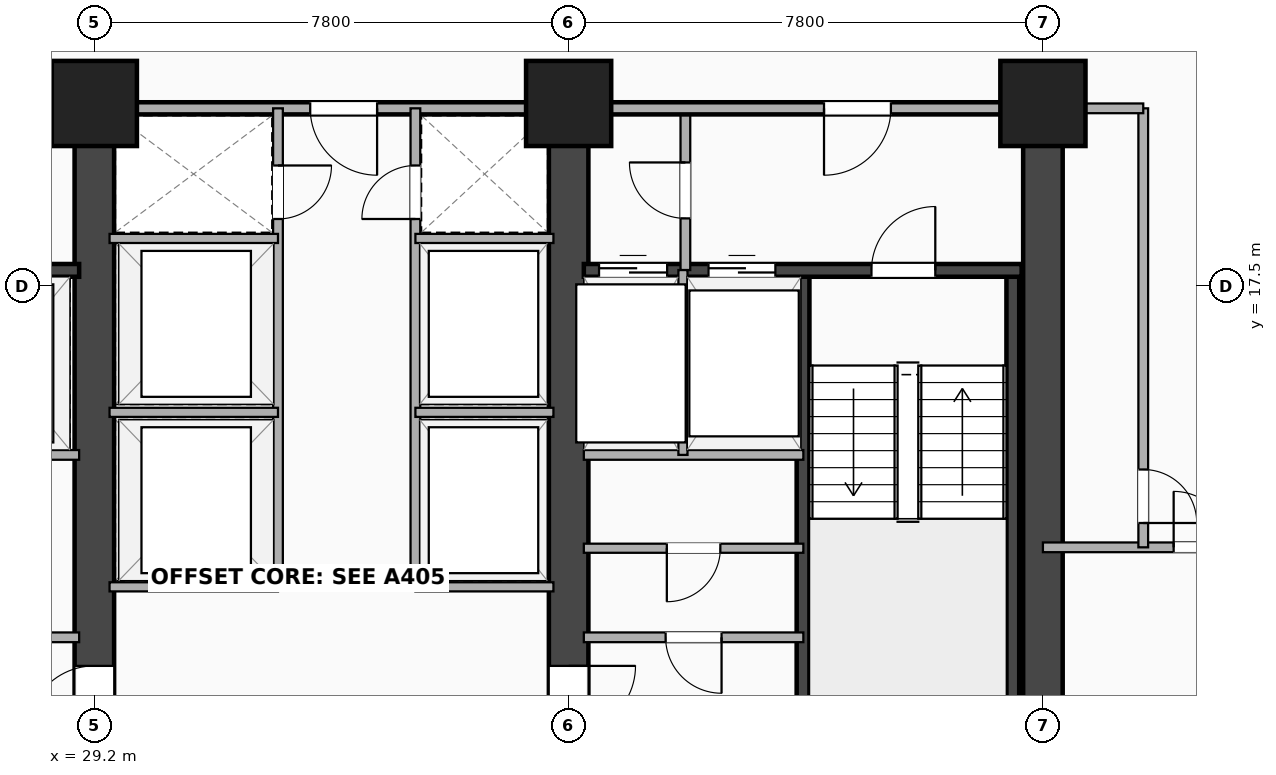
"""IFC4 building model, lengths in metres.
Left out: names, types, materials, properties, quantities, classifications, styles, units other than length and angle.
Written with IfcOpenShell. Run it as: python <this file> out.ifc"""

import sys

from ifc_helpers import new_model, si_unit, direction, frame, frame_2d, origin, origin_2d, place, context, subcontext, project, spatial, rectangle, extrude, element, fill, save


model = new_model("IFC4")
c1 = context("Model", 3, precision=1e-05, world=origin(), true_north=direction((0.0, 1.0)))
c2 = subcontext(c1, "Body", "Model", "MODEL_VIEW")
j1 = project(units=[si_unit("LENGTHUNIT", "METRE"), si_unit("PLANEANGLEUNIT", "RADIAN")], contexts=[c1])
p1 = place(None, origin())
s1 = spatial("IfcSite", under=j1, at=p1, CompositionType="ELEMENT")
p2 = place(p1, origin())
s2 = spatial("IfcBuilding", under=s1, at=p2, CompositionType="ELEMENT")
p3 = place(p2, frame((0.0, 0.0, 71.9)))
s3 = spatial("IfcBuildingStorey", under=s2, at=p3, CompositionType="ELEMENT", Elevation=71.9)
p4 = place(p3, frame((44.8, 3.5, 0.0), z_axis=(0.0, 0.0, 1.0), x_axis=(0.0, 1.0, 0.0)))
e1 = element("IfcWall", 1, at=p4, inside=s3, PredefinedType="SHEAR", context=c2, shape_type="SweptSolid", body=[
    extrude(rectangle(XDim=16.9, YDim=0.65, at=frame_2d((8.45, 0.0))), origin(), (0.0, 0.0, 1.0), 3.18),
])
p5 = place(p3, frame((29.2, 3.5, 0.0), z_axis=(0.0, 0.0, 1.0), x_axis=(0.0, 1.0, 0.0)))
e2 = element("IfcWall", 2, at=p5, inside=s3, PredefinedType="SHEAR", context=c2, shape_type="SweptSolid", body=[
    extrude(rectangle(XDim=16.9, YDim=0.65, at=frame_2d((8.45, 0.0))), origin(), (0.0, 0.0, 1.0), 3.18),
])
p6 = place(p5, frame((7.75, 0.0, 0.0), z_axis=(0.0, 0.0, 1.0), x_axis=(-1.0, 0.0, 0.0)))
e3 = element("IfcOpeningElement", 3, at=p6, cuts=e2, PredefinedType="OPENING", context=c2, shape_type="SweptSolid", body=[
    extrude(rectangle(XDim=1.1, YDim=2.15, at=frame_2d((0.55, 1.075))), frame((0.0, 0.335, 0.0), z_axis=(0.0, -1.0, 0.0), x_axis=(1.0, 0.0, 0.0)), (0.0, 0.0, 1.0), 0.67),
])
p7 = place(p3, frame((37.0, 3.5, 0.0), z_axis=(0.0, 0.0, 1.0), x_axis=(0.0, 1.0, 0.0)))
e4 = element("IfcWall", 4, at=p7, inside=s3, PredefinedType="SHEAR", context=c2, shape_type="SweptSolid", body=[
    extrude(rectangle(XDim=16.9, YDim=0.65, at=frame_2d((8.45, 0.0))), origin(), (0.0, 0.0, 1.0), 3.18),
])
p8 = place(p7, frame((6.65, 0.0, 0.0)))
e5 = element("IfcOpeningElement", 5, at=p8, cuts=e4, PredefinedType="OPENING", context=c2, shape_type="SweptSolid", body=[
    extrude(rectangle(XDim=1.1, YDim=2.15, at=frame_2d((0.55, 1.075))), frame((0.0, 0.335, 0.0), z_axis=(0.0, -1.0, 0.0), x_axis=(1.0, 0.0, 0.0)), (0.0, 0.0, 1.0), 0.67),
])
p9 = place(p3, frame((20.65, 17.755, 0.0), z_axis=(0.0, 0.0, 1.0), x_axis=(1.0, 0.0, 0.0)))
e6 = element("IfcWall", 6, at=p9, inside=s3, PredefinedType="SHEAR", context=c2, shape_type="SweptSolid", body=[
    extrude(rectangle(XDim=8.3, YDim=0.21, at=frame_2d((4.15, 0.0))), origin(), (0.0, 0.0, 1.0), 3.18),
])
p10 = place(p9, frame((2.2, 0.0, 0.0), z_axis=(0.0, 0.0, 1.0), x_axis=(-1.0, 0.0, 0.0)))
e7 = element("IfcOpeningElement", 7, at=p10, cuts=e6, PredefinedType="OPENING", context=c2, shape_type="SweptSolid", body=[
    extrude(rectangle(XDim=1.05, YDim=2.15, at=frame_2d((0.525, 1.075))), frame((0.0, 0.115, 0.0), z_axis=(0.0, -1.0, 0.0), x_axis=(1.0, 0.0, 0.0)), (0.0, 0.0, 1.0), 0.23),
])
p11 = place(p9, frame((4.15, 0.0, 0.0)))
e8 = element("IfcOpeningElement", 8, at=p11, cuts=e6, PredefinedType="OPENING", context=c2, shape_type="SweptSolid", body=[
    extrude(rectangle(XDim=1.1, YDim=2.18, at=frame_2d((0.55, 1.09))), frame((0.0, 0.115, 0.0), z_axis=(0.0, -1.0, 0.0), x_axis=(1.0, 0.0, 0.0)), (0.0, 0.0, 1.0), 0.23),
])
p12 = place(p9, frame((6.45, 0.0, 0.0)))
e9 = element("IfcOpeningElement", 9, at=p12, cuts=e6, PredefinedType="OPENING", context=c2, shape_type="SweptSolid", body=[
    extrude(rectangle(XDim=1.12, YDim=2.2, at=frame_2d((0.56, 1.1))), frame((0.0, 0.115, 0.0), z_axis=(0.0, -1.0, 0.0), x_axis=(1.0, 0.0, 0.0)), (0.0, 0.0, 1.0), 0.23),
])
for number, where, z_axis, x_axis in (
    (10, (40.855, 9.745, 0.0), (0.0, 0.0, 1.0), (0.0, 1.0, 0.0)),
    (11, (44.305, 9.745, 0.0), (0.0, 0.0, 1.0), (0.0, 1.0, 0.0)),
):
    element("IfcWall", number, at=place(p3, frame(where, z_axis=z_axis, x_axis=x_axis)), inside=s3, PredefinedType="SHEAR", context=c2, shape_type="SweptSolid", body=[
        extrude(rectangle(XDim=8.01, YDim=0.21, at=frame_2d((4.005, 0.0))), origin(), (0.0, 0.0, 1.0), 3.18),
    ])
p13 = place(p3, frame((37.25, 17.755, 0.0), z_axis=(0.0, 0.0, 1.0), x_axis=(1.0, 0.0, 0.0)))
e12 = element("IfcWall", 12, at=p13, inside=s3, PredefinedType="SHEAR", context=c2, shape_type="SweptSolid", body=[
    extrude(rectangle(XDim=7.2, YDim=0.21, at=frame_2d((3.6, 0.0))), origin(), (0.0, 0.0, 1.0), 3.18),
])
p14 = place(p13, frame((0.25, 0.0, 0.0)))
e13 = element("IfcOpeningElement", 13, at=p14, cuts=e12, PredefinedType="OPENING", context=c2, shape_type="SweptSolid", body=[
    extrude(rectangle(XDim=1.12, YDim=2.2, at=frame_2d((0.56, 1.1))), frame((0.0, 0.115, 0.0), z_axis=(0.0, -1.0, 0.0), x_axis=(1.0, 0.0, 0.0)), (0.0, 0.0, 1.0), 0.23),
])
p15 = place(p13, frame((2.05, 0.0, 0.0)))
e14 = element("IfcOpeningElement", 14, at=p15, cuts=e12, PredefinedType="OPENING", context=c2, shape_type="SweptSolid", body=[
    extrude(rectangle(XDim=1.1, YDim=2.18, at=frame_2d((0.55, 1.09))), frame((0.0, 0.115, 0.0), z_axis=(0.0, -1.0, 0.0), x_axis=(1.0, 0.0, 0.0)), (0.0, 0.0, 1.0), 0.23),
])
p16 = place(p13, frame((5.78, 0.0, 0.0), z_axis=(0.0, 0.0, 1.0), x_axis=(-1.0, 0.0, 0.0)))
e15 = element("IfcOpeningElement", 15, at=p16, cuts=e12, PredefinedType="OPENING", context=c2, shape_type="SweptSolid", body=[
    extrude(rectangle(XDim=1.05, YDim=2.15, at=frame_2d((0.525, 1.075))), frame((0.0, 0.115, 0.0), z_axis=(0.0, -1.0, 0.0), x_axis=(1.0, 0.0, 0.0)), (0.0, 0.0, 1.0), 0.23),
])
for number, where, z_axis, x_axis in (
    (16, (29.2, 20.5, -0.28), (0.0, 0.0, 1.0), (1.0, 0.0, 0.0)),
    (17, (37.0, 20.5, -0.28), (0.0, 0.0, 1.0), (1.0, 0.0, 0.0)),
    (18, (44.8, 20.5, -0.28), (0.0, 0.0, 1.0), (1.0, 0.0, 0.0)),
):
    element("IfcColumn", number, at=place(p3, frame(where, z_axis=z_axis, x_axis=x_axis)), inside=s3, PredefinedType="COLUMN", context=c2, shape_type="SweptSolid", body=[
        extrude(rectangle(XDim=1.4, YDim=1.4, at=origin_2d()), origin(), (0.0, 0.0, 1.0), 3.46),
    ])
p17 = place(p3, frame((38.92, 17.76, 0.0), z_axis=(0.0, 0.0, 1.0), x_axis=(0.0, 1.0, 0.0)))
e19 = element("IfcWall", 19, at=p17, inside=s3, PredefinedType="PARTITIONING", context=c2, shape_type="SweptSolid", body=[
    extrude(rectangle(XDim=2.66, YDim=0.16, at=frame_2d((1.33, 0.0))), origin(), (0.0, 0.0, 1.0), 2.47),
])
p18 = place(p17, frame((1.77, 0.0, 0.0), z_axis=(0.0, 0.0, 1.0), x_axis=(-1.0, 0.0, 0.0)))
e20 = element("IfcOpeningElement", 20, at=p18, cuts=e19, PredefinedType="OPENING", context=c2, shape_type="SweptSolid", body=[
    extrude(rectangle(XDim=0.92, YDim=2.08, at=frame_2d((0.46, 1.04))), frame((0.0, 0.09, 0.0), z_axis=(0.0, -1.0, 0.0), x_axis=(1.0, 0.0, 0.0)), (0.0, 0.0, 1.0), 0.18),
])
p19 = place(p3, frame((24.22, 14.72, 0.0), z_axis=(0.0, 0.0, 1.0), x_axis=(1.0, 0.0, 0.0)))
e21 = element("IfcWall", 21, at=p19, inside=s3, PredefinedType="PARTITIONING", context=c2, shape_type="SweptSolid", body=[
    extrude(rectangle(XDim=4.73, YDim=0.16, at=frame_2d((2.365, 0.0))), origin(), (0.0, 0.0, 1.0), 3.18),
])
p20 = place(p3, frame((37.25, 14.72, 0.0), z_axis=(0.0, 0.0, 1.0), x_axis=(1.0, 0.0, 0.0)))
e22 = element("IfcWall", 22, at=p20, inside=s3, PredefinedType="PARTITIONING", context=c2, shape_type="SweptSolid", body=[
    extrude(rectangle(XDim=3.61, YDim=0.16, at=frame_2d((1.805, 0.0))), origin(), (0.0, 0.0, 1.0), 3.18),
])
p21 = place(p3, frame((38.88, 14.72, 0.0), z_axis=(0.0, 0.0, 1.0), x_axis=(0.0, 1.0, 0.0)))
e23 = element("IfcWall", 23, at=p21, inside=s3, PredefinedType="PARTITIONING", context=c2, shape_type="SweptSolid", body=[
    extrude(rectangle(XDim=3.04, YDim=0.15, at=frame_2d((1.52, 0.0))), origin(), (0.0, 0.0, 1.0), 3.18),
])
p22 = place(p3, frame((26.38, 20.42, 0.0), z_axis=(0.0, 0.0, 1.0), x_axis=(1.0, 0.0, 0.0)))
e24 = element("IfcWall", 24, at=p22, inside=s3, PredefinedType="PARTITIONING", context=c2, shape_type="SweptSolid", body=[
    extrude(rectangle(XDim=2.82, YDim=0.2, at=frame_2d((1.41, 0.0))), origin(), (0.0, 0.0, 1.0), 2.47),
])
p23 = place(p3, frame((29.2, 20.42, 0.0), z_axis=(0.0, 0.0, 1.0), x_axis=(1.0, 0.0, 0.0)))
e25 = element("IfcWall", 25, at=p23, inside=s3, PredefinedType="PARTITIONING", context=c2, shape_type="SweptSolid", body=[
    extrude(rectangle(XDim=7.8, YDim=0.2, at=frame_2d((3.9, 0.0))), origin(), (0.0, 0.0, 1.0), 2.47),
])
p24 = place(p23, frame((3.55, 0.0, 0.0)))
e26 = element("IfcOpeningElement", 26, at=p24, cuts=e25, PredefinedType="OPENING", context=c2, shape_type="SweptSolid", body=[
    extrude(rectangle(XDim=1.1, YDim=2.15, at=frame_2d((0.55, 1.075))), frame((0.0, 0.11, 0.0), z_axis=(0.0, -1.0, 0.0), x_axis=(1.0, 0.0, 0.0)), (0.0, 0.0, 1.0), 0.22),
])
p25 = place(p3, frame((37.0, 20.42, 0.0), z_axis=(0.0, 0.0, 1.0), x_axis=(1.0, 0.0, 0.0)))
e27 = element("IfcWall", 27, at=p25, inside=s3, PredefinedType="PARTITIONING", context=c2, shape_type="SweptSolid", body=[
    extrude(rectangle(XDim=7.45, YDim=0.2, at=frame_2d((3.725, 0.0))), origin(), (0.0, 0.0, 1.0), 2.47),
])
p26 = place(p25, frame((4.2, 0.0, 0.0)))
e28 = element("IfcOpeningElement", 28, at=p26, cuts=e27, PredefinedType="OPENING", context=c2, shape_type="SweptSolid", body=[
    extrude(rectangle(XDim=1.1, YDim=2.15, at=frame_2d((0.55, 1.075))), frame((0.0, 0.11, 0.0), z_axis=(0.0, -1.0, 0.0), x_axis=(1.0, 0.0, 0.0)), (0.0, 0.0, 1.0), 0.22),
])
p27 = place(p3, frame((26.49, 11.72, 0.0), z_axis=(0.0, 0.0, 1.0), x_axis=(1.0, 0.0, 0.0)))
e29 = element("IfcWall", 29, at=p27, inside=s3, PredefinedType="PARTITIONING", context=c2, shape_type="SweptSolid", body=[
    extrude(rectangle(XDim=2.459, YDim=0.16, at=frame_2d((1.23, 0.0))), origin(), (0.0, 0.0, 1.0), 3.18),
])
p28 = place(p27, frame((0.77, 0.0, 0.0)))
e30 = element("IfcOpeningElement", 30, at=p28, cuts=e29, PredefinedType="OPENING", context=c2, shape_type="SweptSolid", body=[
    extrude(rectangle(XDim=0.92, YDim=2.08, at=frame_2d((0.46, 1.04))), frame((0.0, 0.09, 0.0), z_axis=(0.0, -1.0, 0.0), x_axis=(1.0, 0.0, 0.0)), (0.0, 0.0, 1.0), 0.18),
])
p29 = place(p3, frame((37.25, 11.72, 0.0), z_axis=(0.0, 0.0, 1.0), x_axis=(1.0, 0.0, 0.0)))
e31 = element("IfcWall", 31, at=p29, inside=s3, PredefinedType="PARTITIONING", context=c2, shape_type="SweptSolid", body=[
    extrude(rectangle(XDim=3.61, YDim=0.16, at=frame_2d((1.805, 0.0))), origin(), (0.0, 0.0, 1.0), 3.18),
])
p30 = place(p29, frame((1.345, 0.0, 0.0)))
e32 = element("IfcOpeningElement", 32, at=p30, cuts=e31, PredefinedType="OPENING", context=c2, shape_type="SweptSolid", body=[
    extrude(rectangle(XDim=0.92, YDim=2.08, at=frame_2d((0.46, 1.04))), frame((0.0, 0.09, 0.0), z_axis=(0.0, -1.0, 0.0), x_axis=(1.0, 0.0, 0.0)), (0.0, 0.0, 1.0), 0.18),
])
p31 = place(p3, frame((37.25, 13.185, 0.0), z_axis=(0.0, 0.0, 1.0), x_axis=(1.0, 0.0, 0.0)))
e33 = element("IfcWall", 33, at=p31, inside=s3, PredefinedType="PARTITIONING", context=c2, shape_type="SweptSolid", body=[
    extrude(rectangle(XDim=3.61, YDim=0.15, at=frame_2d((1.805, 0.0))), origin(), (0.0, 0.0, 1.0), 3.18),
])
p32 = place(p31, frame((1.365, 0.0, 0.0)))
e34 = element("IfcOpeningElement", 34, at=p32, cuts=e33, PredefinedType="OPENING", context=c2, shape_type="SweptSolid", body=[
    extrude(rectangle(XDim=0.88, YDim=2.08, at=frame_2d((0.44, 1.04))), frame((0.0, 0.085, 0.0), z_axis=(0.0, -1.0, 0.0), x_axis=(1.0, 0.0, 0.0)), (0.0, 0.0, 1.0), 0.17),
])
p33 = place(p3, frame((32.22, 12.5, 0.0), z_axis=(0.0, 0.0, 1.0), x_axis=(0.0, 1.0, 0.0)))
e35 = element("IfcWall", 35, at=p33, inside=s3, PredefinedType="PARTITIONING", context=c2, shape_type="SweptSolid", body=[
    extrude(rectangle(XDim=7.92, YDim=0.16, at=frame_2d((3.96, 0.0))), origin(), (0.0, 0.0, 1.0), 2.47),
])
p34 = place(p33, frame((6.1, 0.0, 0.0)))
e36 = element("IfcOpeningElement", 36, at=p34, cuts=e35, PredefinedType="OPENING", context=c2, shape_type="SweptSolid", body=[
    extrude(rectangle(XDim=0.88, YDim=2.08, at=frame_2d((0.44, 1.04))), frame((0.0, 0.09, 0.0), z_axis=(0.0, -1.0, 0.0), x_axis=(1.0, 0.0, 0.0)), (0.0, 0.0, 1.0), 0.18),
])
p35 = place(p3, frame((34.48, 12.5, 0.0), z_axis=(0.0, 0.0, 1.0), x_axis=(0.0, 1.0, 0.0)))
e37 = element("IfcWall", 37, at=p35, inside=s3, PredefinedType="PARTITIONING", context=c2, shape_type="SweptSolid", body=[
    extrude(rectangle(XDim=7.92, YDim=0.16, at=frame_2d((3.96, 0.0))), origin(), (0.0, 0.0, 1.0), 2.47),
])
p36 = place(p35, frame((6.98, 0.0, 0.0), z_axis=(0.0, 0.0, 1.0), x_axis=(-1.0, 0.0, 0.0)))
e38 = element("IfcOpeningElement", 38, at=p36, cuts=e37, PredefinedType="OPENING", context=c2, shape_type="SweptSolid", body=[
    extrude(rectangle(XDim=0.88, YDim=2.08, at=frame_2d((0.44, 1.04))), frame((0.0, 0.09, 0.0), z_axis=(0.0, -1.0, 0.0), x_axis=(1.0, 0.0, 0.0)), (0.0, 0.0, 1.0), 0.18),
])
p37 = place(p3, frame((29.45, 12.55, 0.0), z_axis=(0.0, 0.0, 1.0), x_axis=(1.0, 0.0, 0.0)))
e39 = element("IfcWall", 39, at=p37, inside=s3, PredefinedType="PARTITIONING", context=c2, shape_type="SweptSolid", body=[
    extrude(rectangle(XDim=2.77, YDim=0.15, at=frame_2d((1.385, 0.0))), origin(), (0.0, 0.0, 1.0), 3.18),
])
p38 = place(p3, frame((34.48, 12.55, 0.0), z_axis=(0.0, 0.0, 1.0), x_axis=(1.0, 0.0, 0.0)))
e40 = element("IfcWall", 40, at=p38, inside=s3, PredefinedType="PARTITIONING", context=c2, shape_type="SweptSolid", body=[
    extrude(rectangle(XDim=2.27, YDim=0.15, at=frame_2d((1.135, 0.0))), origin(), (0.0, 0.0, 1.0), 3.18),
])
p39 = place(p3, frame((29.45, 15.42, 0.0), z_axis=(0.0, 0.0, 1.0), x_axis=(1.0, 0.0, 0.0)))
e41 = element("IfcWall", 41, at=p39, inside=s3, PredefinedType="PARTITIONING", context=c2, shape_type="SweptSolid", body=[
    extrude(rectangle(XDim=2.77, YDim=0.15, at=frame_2d((1.385, 0.0))), origin(), (0.0, 0.0, 1.0), 3.18),
])
p40 = place(p3, frame((34.48, 15.42, 0.0), z_axis=(0.0, 0.0, 1.0), x_axis=(1.0, 0.0, 0.0)))
e42 = element("IfcWall", 42, at=p40, inside=s3, PredefinedType="PARTITIONING", context=c2, shape_type="SweptSolid", body=[
    extrude(rectangle(XDim=2.27, YDim=0.15, at=frame_2d((1.135, 0.0))), origin(), (0.0, 0.0, 1.0), 3.18),
])
p41 = place(p3, frame((29.45, 18.28, 0.0), z_axis=(0.0, 0.0, 1.0), x_axis=(1.0, 0.0, 0.0)))
e43 = element("IfcWall", 43, at=p41, inside=s3, PredefinedType="PARTITIONING", context=c2, shape_type="SweptSolid", body=[
    extrude(rectangle(XDim=2.77, YDim=0.15, at=frame_2d((1.385, 0.0))), origin(), (0.0, 0.0, 1.0), 3.18),
])
p42 = place(p3, frame((34.48, 18.28, 0.0), z_axis=(0.0, 0.0, 1.0), x_axis=(1.0, 0.0, 0.0)))
e44 = element("IfcWall", 44, at=p42, inside=s3, PredefinedType="PARTITIONING", context=c2, shape_type="SweptSolid", body=[
    extrude(rectangle(XDim=2.27, YDim=0.15, at=frame_2d((1.135, 0.0))), origin(), (0.0, 0.0, 1.0), 3.18),
])
p43 = place(p3, frame((44.8, 13.2, 0.0), z_axis=(0.0, 0.0, 1.0), x_axis=(1.0, 0.0, 0.0)))
e45 = element("IfcWall", 45, at=p43, inside=s3, PredefinedType="PARTITIONING", context=c2, shape_type="SweptSolid", body=[
    extrude(rectangle(XDim=3.65, YDim=0.16, at=frame_2d((1.825, 0.0))), origin(), (0.0, 0.0, 1.0), 2.47),
])
p44 = place(p43, frame((3.07, 0.0, 0.0), z_axis=(0.0, 0.0, 1.0), x_axis=(-1.0, 0.0, 0.0)))
e46 = element("IfcOpeningElement", 46, at=p44, cuts=e45, PredefinedType="OPENING", context=c2, shape_type="SweptSolid", body=[
    extrude(rectangle(XDim=0.92, YDim=2.08, at=frame_2d((0.46, 1.04))), frame((0.0, 0.09, 0.0), z_axis=(0.0, -1.0, 0.0), x_axis=(1.0, 0.0, 0.0)), (0.0, 0.0, 1.0), 0.18),
])
p45 = place(p3, frame((46.45, 13.2, 0.0), z_axis=(0.0, 0.0, 1.0), x_axis=(0.0, 1.0, 0.0)))
e47 = element("IfcWall", 47, at=p45, inside=s3, PredefinedType="PARTITIONING", context=c2, shape_type="SweptSolid", body=[
    extrude(rectangle(XDim=7.22, YDim=0.16, at=frame_2d((3.61, 0.0))), origin(), (0.0, 0.0, 1.0), 2.47),
])
p46 = place(p45, frame((0.4, 0.0, 0.0)))
e48 = element("IfcOpeningElement", 48, at=p46, cuts=e47, PredefinedType="OPENING", context=c2, shape_type="SweptSolid", body=[
    extrude(rectangle(XDim=0.88, YDim=2.08, at=frame_2d((0.44, 1.04))), frame((0.0, 0.09, 0.0), z_axis=(0.0, -1.0, 0.0), x_axis=(1.0, 0.0, 0.0)), (0.0, 0.0, 1.0), 0.18),
])
p47 = place(p3, frame((44.8, 20.42, 0.0), z_axis=(0.0, 0.0, 1.0), x_axis=(1.0, 0.0, 0.0)))
e49 = element("IfcWall", 49, at=p47, inside=s3, PredefinedType="PARTITIONING", context=c2, shape_type="SweptSolid", body=[
    extrude(rectangle(XDim=1.65, YDim=0.16, at=frame_2d((0.825, 0.0))), origin(), (0.0, 0.0, 1.0), 2.47),
])
p48 = place(p14, origin())
e50 = element("IfcDoor", 50, at=p48, inside=s3, OperationType="DOUBLE_DOOR_SLIDING", PredefinedType="DOOR", context=c2, shape_type="SweptSolid", body=[
    extrude(rectangle(XDim=1.12, YDim=2.2, at=frame_2d((0.56, 1.1))), frame((0.0, 0.025, 0.0), z_axis=(0.0, -1.0, 0.0), x_axis=(1.0, 0.0, 0.0)), (0.0, 0.0, 1.0), 0.05),
])
fill(e13, e50)
p49 = place(p15, origin())
e51 = element("IfcDoor", 51, at=p49, inside=s3, OperationType="DOUBLE_DOOR_SLIDING", PredefinedType="DOOR", context=c2, shape_type="SweptSolid", body=[
    extrude(rectangle(XDim=1.1, YDim=2.18, at=frame_2d((0.55, 1.09))), frame((0.0, 0.025, 0.0), z_axis=(0.0, -1.0, 0.0), x_axis=(1.0, 0.0, 0.0)), (0.0, 0.0, 1.0), 0.05),
])
fill(e14, e51)
p50 = place(p16, origin())
e52 = element("IfcDoor", 52, at=p50, inside=s3, OperationType="SINGLE_SWING_RIGHT", PredefinedType="DOOR", context=c2, shape_type="SweptSolid", body=[
    extrude(rectangle(XDim=1.05, YDim=2.15, at=frame_2d((0.525, 1.075))), frame((0.0, 0.025, 0.0), z_axis=(0.0, -1.0, 0.0), x_axis=(1.0, 0.0, 0.0)), (0.0, 0.0, 1.0), 0.05),
])
fill(e15, e52)
p51 = place(p6, origin())
e53 = element("IfcDoor", 53, at=p51, inside=s3, OperationType="SINGLE_SWING_LEFT", PredefinedType="DOOR", context=c2, shape_type="SweptSolid", body=[
    extrude(rectangle(XDim=1.1, YDim=2.15, at=frame_2d((0.55, 1.075))), frame((0.0, 0.025, 0.0), z_axis=(0.0, -1.0, 0.0), x_axis=(1.0, 0.0, 0.0)), (0.0, 0.0, 1.0), 0.05),
])
fill(e3, e53)
p52 = place(p8, origin())
e54 = element("IfcDoor", 54, at=p52, inside=s3, OperationType="SINGLE_SWING_RIGHT", PredefinedType="DOOR", context=c2, shape_type="SweptSolid", body=[
    extrude(rectangle(XDim=1.1, YDim=2.15, at=frame_2d((0.55, 1.075))), frame((0.0, 0.025, 0.0), z_axis=(0.0, -1.0, 0.0), x_axis=(1.0, 0.0, 0.0)), (0.0, 0.0, 1.0), 0.05),
])
fill(e5, e54)
p53 = place(p18, origin())
e55 = element("IfcDoor", 55, at=p53, inside=s3, OperationType="SINGLE_SWING_RIGHT", PredefinedType="DOOR", context=c2, shape_type="SweptSolid", body=[
    extrude(rectangle(XDim=0.92, YDim=2.08, at=frame_2d((0.46, 1.04))), frame((0.0, 0.025, 0.0), z_axis=(0.0, -1.0, 0.0), x_axis=(1.0, 0.0, 0.0)), (0.0, 0.0, 1.0), 0.05),
])
fill(e20, e55)
p54 = place(p24, origin())
e56 = element("IfcDoor", 56, at=p54, inside=s3, OperationType="SINGLE_SWING_RIGHT", PredefinedType="DOOR", context=c2, shape_type="SweptSolid", body=[
    extrude(rectangle(XDim=1.1, YDim=2.15, at=frame_2d((0.55, 1.075))), frame((0.0, 0.025, 0.0), z_axis=(0.0, -1.0, 0.0), x_axis=(1.0, 0.0, 0.0)), (0.0, 0.0, 1.0), 0.05),
])
fill(e26, e56)
p55 = place(p26, origin())
e57 = element("IfcDoor", 57, at=p55, inside=s3, OperationType="SINGLE_SWING_LEFT", PredefinedType="DOOR", context=c2, shape_type="SweptSolid", body=[
    extrude(rectangle(XDim=1.1, YDim=2.15, at=frame_2d((0.55, 1.075))), frame((0.0, 0.025, 0.0), z_axis=(0.0, -1.0, 0.0), x_axis=(1.0, 0.0, 0.0)), (0.0, 0.0, 1.0), 0.05),
])
fill(e28, e57)
p56 = place(p30, origin())
e58 = element("IfcDoor", 58, at=p56, inside=s3, OperationType="SINGLE_SWING_RIGHT", PredefinedType="DOOR", context=c2, shape_type="SweptSolid", body=[
    extrude(rectangle(XDim=0.92, YDim=2.08, at=frame_2d((0.46, 1.04))), frame((0.0, 0.025, 0.0), z_axis=(0.0, -1.0, 0.0), x_axis=(1.0, 0.0, 0.0)), (0.0, 0.0, 1.0), 0.05),
])
fill(e32, e58)
p57 = place(p32, origin())
e59 = element("IfcDoor", 59, at=p57, inside=s3, OperationType="SINGLE_SWING_LEFT", PredefinedType="DOOR", context=c2, shape_type="SweptSolid", body=[
    extrude(rectangle(XDim=0.88, YDim=2.08, at=frame_2d((0.44, 1.04))), frame((0.0, 0.025, 0.0), z_axis=(0.0, -1.0, 0.0), x_axis=(1.0, 0.0, 0.0)), (0.0, 0.0, 1.0), 0.05),
])
fill(e34, e59)
p58 = place(p34, origin())
e60 = element("IfcDoor", 60, at=p58, inside=s3, OperationType="SINGLE_SWING_RIGHT", PredefinedType="DOOR", context=c2, shape_type="SweptSolid", body=[
    extrude(rectangle(XDim=0.88, YDim=2.08, at=frame_2d((0.44, 1.04))), frame((0.0, 0.025, 0.0), z_axis=(0.0, -1.0, 0.0), x_axis=(1.0, 0.0, 0.0)), (0.0, 0.0, 1.0), 0.05),
])
fill(e36, e60)
p59 = place(p36, origin())
e61 = element("IfcDoor", 61, at=p59, inside=s3, OperationType="SINGLE_SWING_LEFT", PredefinedType="DOOR", context=c2, shape_type="SweptSolid", body=[
    extrude(rectangle(XDim=0.88, YDim=2.08, at=frame_2d((0.44, 1.04))), frame((0.0, 0.025, 0.0), z_axis=(0.0, -1.0, 0.0), x_axis=(1.0, 0.0, 0.0)), (0.0, 0.0, 1.0), 0.05),
])
fill(e38, e61)
p60 = place(p44, origin())
e62 = element("IfcDoor", 62, at=p60, inside=s3, OperationType="SINGLE_SWING_LEFT", PredefinedType="DOOR", context=c2, shape_type="SweptSolid", body=[
    extrude(rectangle(XDim=0.92, YDim=2.08, at=frame_2d((0.46, 1.04))), frame((0.0, 0.025, 0.0), z_axis=(0.0, -1.0, 0.0), x_axis=(1.0, 0.0, 0.0)), (0.0, 0.0, 1.0), 0.05),
])
fill(e46, e62)
p61 = place(p46, origin())
e63 = element("IfcDoor", 63, at=p61, inside=s3, OperationType="SINGLE_SWING_LEFT", PredefinedType="DOOR", context=c2, shape_type="SweptSolid", body=[
    extrude(rectangle(XDim=0.88, YDim=2.08, at=frame_2d((0.44, 1.04))), frame((0.0, 0.025, 0.0), z_axis=(0.0, -1.0, 0.0), x_axis=(1.0, 0.0, 0.0)), (0.0, 0.0, 1.0), 0.05),
])
fill(e48, e63)
save(model, sys.argv[1])
